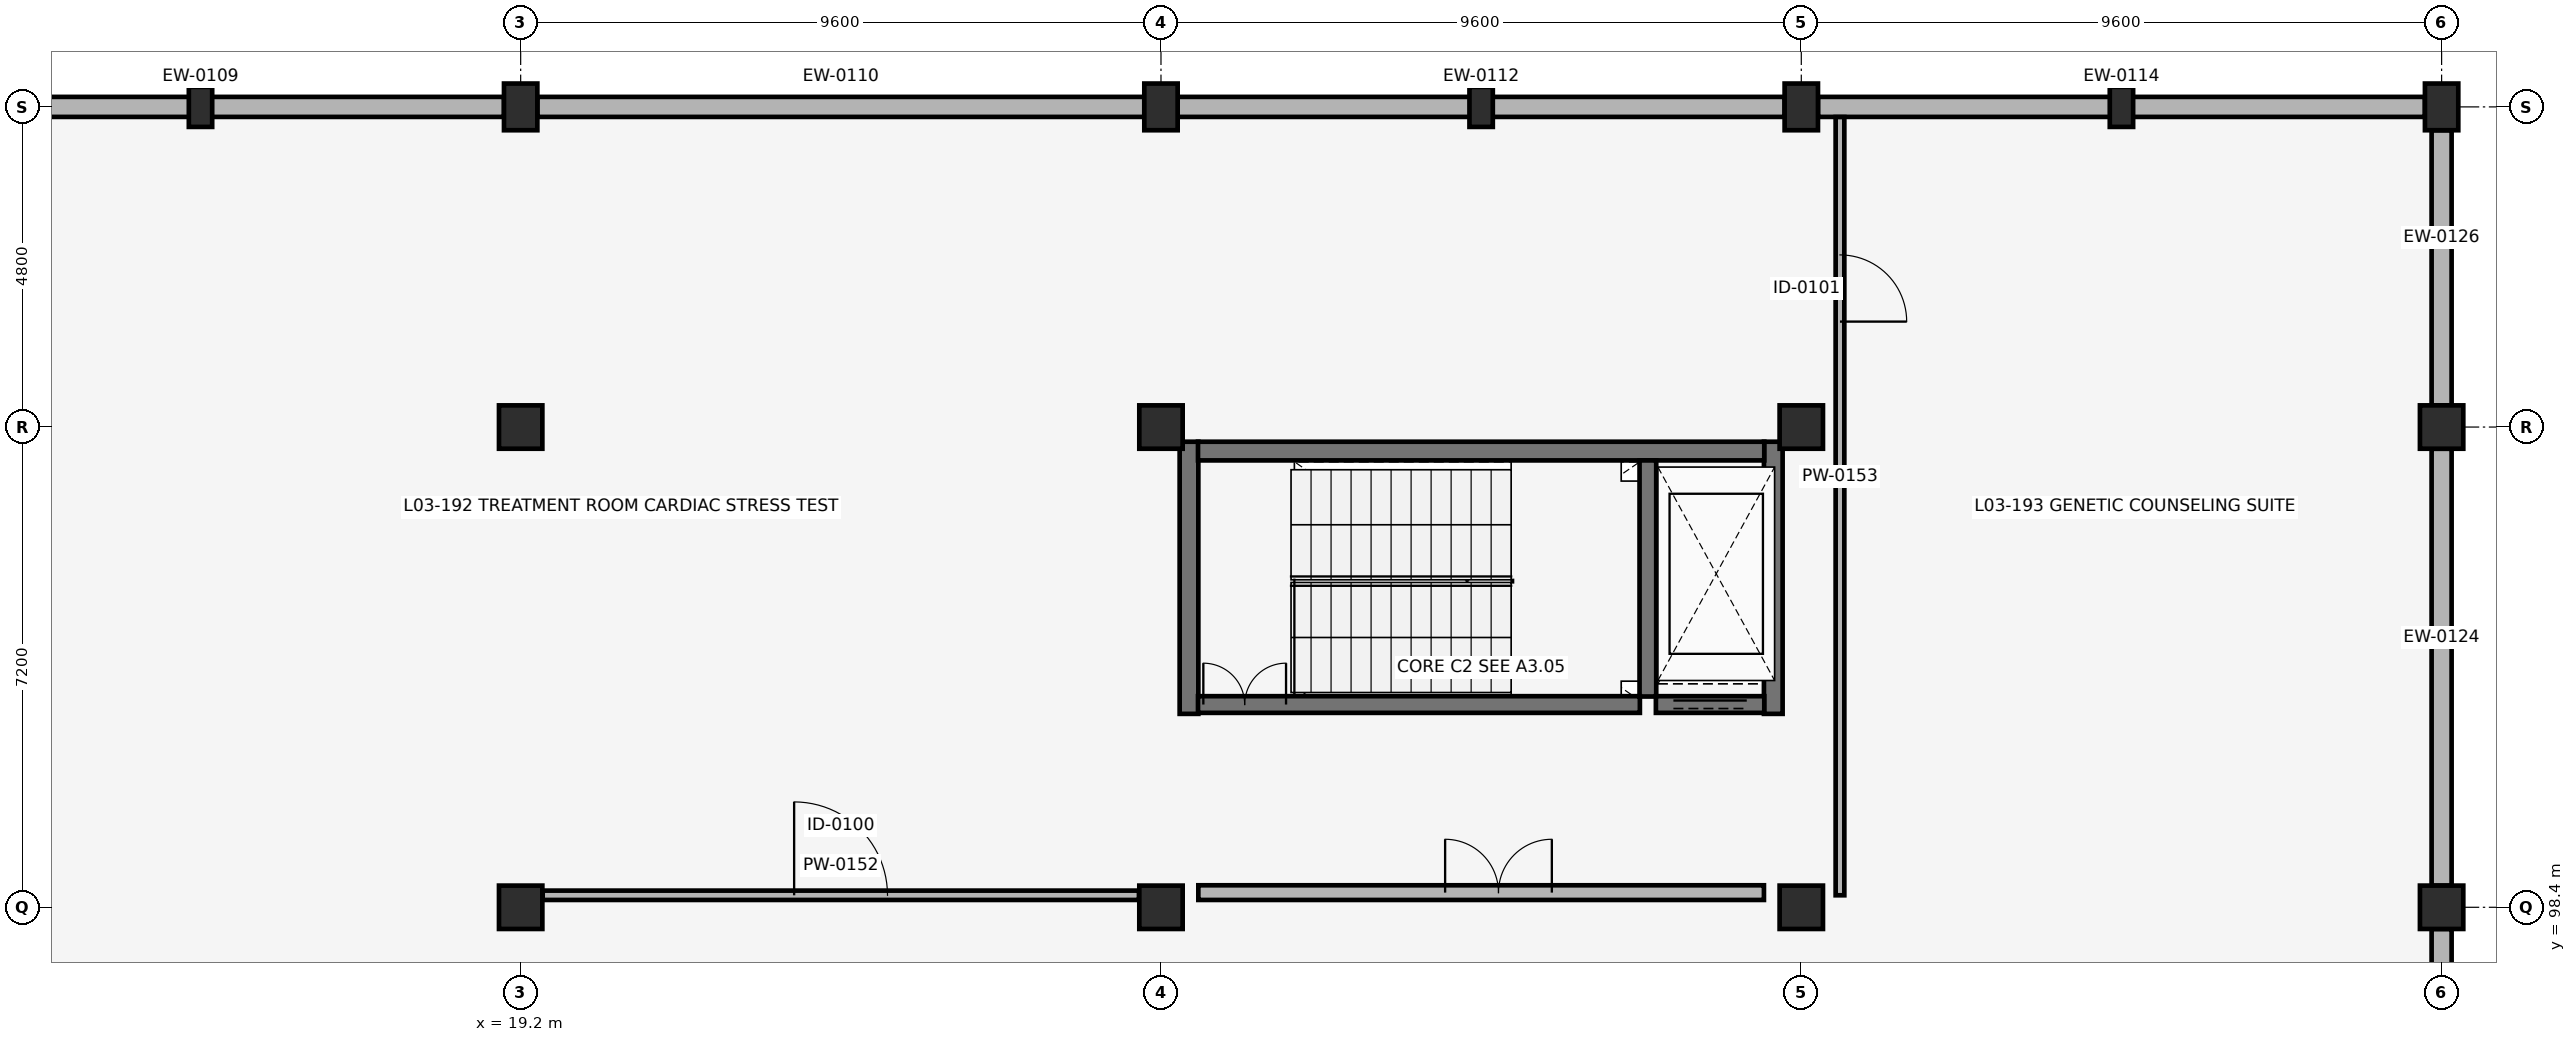
"""IFC4 building model, lengths in metres.
Left out: names, types, materials, properties, quantities, classifications, styles, units other than length and angle.
Written with IfcOpenShell. Run it as: python <this file> out.ifc"""

import sys

from ifc_helpers import new_model, si_unit, direction, frame, frame_2d, origin, origin_2d, place, context, subcontext, project, spatial, rectangle, extrude, element, fill, save


model = new_model("IFC4")
c1 = context("Model", 3, precision=1e-05, world=origin(), true_north=direction((0.0, 1.0)))
c2 = subcontext(c1, "Body", "Model", "MODEL_VIEW")
j1 = project(units=[si_unit("LENGTHUNIT", "METRE"), si_unit("PLANEANGLEUNIT", "RADIAN")], contexts=[c1])
p1 = place(None, origin())
s1 = spatial("IfcSite", under=j1, at=p1, CompositionType="ELEMENT")
p2 = place(p1, origin())
s2 = spatial("IfcBuilding", under=s1, at=p2, CompositionType="ELEMENT")
p3 = place(p2, frame((0.0, 0.0, 12.58)))
s3 = spatial("IfcBuildingStorey", under=s2, at=p3, CompositionType="ELEMENT", Elevation=12.58)
for number, where, z_axis, x_axis in (
    (1, (19.2, 98.4, 0.0), (0.0, 0.0, 1.0), (1.0, 0.0, 0.0)),
    (2, (19.2, 105.6, 0.0), (0.0, 0.0, 1.0), (1.0, 0.0, 0.0)),
):
    element("IfcColumn", number, at=place(p3, frame(where, z_axis=z_axis, x_axis=x_axis)), inside=s3, PredefinedType="COLUMN", context=c2, shape_type="SweptSolid", body=[
        extrude(rectangle(XDim=0.65, YDim=0.65, at=origin_2d()), origin(), (0.0, 0.0, 1.0), 4.08),
    ])
p4 = place(p3, frame((19.2, 110.4, 0.0), z_axis=(0.0, 0.0, 1.0), x_axis=(1.0, 0.0, 0.0)))
e3 = element("IfcColumn", 3, at=p4, inside=s3, PredefinedType="COLUMN", context=c2, shape_type="SweptSolid", body=[
    extrude(rectangle(XDim=0.5, YDim=0.7, at=origin_2d()), origin(), (0.0, 0.0, 1.0), 4.08),
])
for number, where, z_axis, x_axis in (
    (4, (28.8, 98.4, 0.0), (0.0, 0.0, 1.0), (1.0, 0.0, 0.0)),
    (5, (28.8, 105.6, 0.0), (0.0, 0.0, 1.0), (1.0, 0.0, 0.0)),
):
    element("IfcColumn", number, at=place(p3, frame(where, z_axis=z_axis, x_axis=x_axis)), inside=s3, PredefinedType="COLUMN", context=c2, shape_type="SweptSolid", body=[
        extrude(rectangle(XDim=0.65, YDim=0.65, at=origin_2d()), origin(), (0.0, 0.0, 1.0), 4.08),
    ])
p5 = place(p3, frame((28.8, 110.4, 0.0), z_axis=(0.0, 0.0, 1.0), x_axis=(1.0, 0.0, 0.0)))
e6 = element("IfcColumn", 6, at=p5, inside=s3, PredefinedType="COLUMN", context=c2, shape_type="SweptSolid", body=[
    extrude(rectangle(XDim=0.5, YDim=0.7, at=origin_2d()), origin(), (0.0, 0.0, 1.0), 4.08),
])
for number, where, z_axis, x_axis in (
    (7, (38.4, 98.4, 0.0), (0.0, 0.0, 1.0), (1.0, 0.0, 0.0)),
    (8, (38.4, 105.6, 0.0), (0.0, 0.0, 1.0), (1.0, 0.0, 0.0)),
):
    element("IfcColumn", number, at=place(p3, frame(where, z_axis=z_axis, x_axis=x_axis)), inside=s3, PredefinedType="COLUMN", context=c2, shape_type="SweptSolid", body=[
        extrude(rectangle(XDim=0.65, YDim=0.65, at=origin_2d()), origin(), (0.0, 0.0, 1.0), 4.08),
    ])
p6 = place(p3, frame((38.4, 110.4, 0.0), z_axis=(0.0, 0.0, 1.0), x_axis=(1.0, 0.0, 0.0)))
e9 = element("IfcColumn", 9, at=p6, inside=s3, PredefinedType="COLUMN", context=c2, shape_type="SweptSolid", body=[
    extrude(rectangle(XDim=0.5, YDim=0.7, at=origin_2d()), origin(), (0.0, 0.0, 1.0), 4.08),
])
for number, where, z_axis, x_axis in (
    (10, (48.0, 98.4, 0.0), (0.0, 0.0, 1.0), (1.0, 0.0, 0.0)),
    (11, (48.0, 105.6, 0.0), (0.0, 0.0, 1.0), (1.0, 0.0, 0.0)),
):
    element("IfcColumn", number, at=place(p3, frame(where, z_axis=z_axis, x_axis=x_axis)), inside=s3, PredefinedType="COLUMN", context=c2, shape_type="SweptSolid", body=[
        extrude(rectangle(XDim=0.65, YDim=0.65, at=origin_2d()), origin(), (0.0, 0.0, 1.0), 4.08),
    ])
p7 = place(p3, frame((48.0, 110.4, 0.0), z_axis=(0.0, 0.0, 1.0), x_axis=(1.0, 0.0, 0.0)))
e12 = element("IfcColumn", 12, at=p7, inside=s3, PredefinedType="COLUMN", context=c2, shape_type="SweptSolid", body=[
    extrude(rectangle(XDim=0.5, YDim=0.7, at=origin_2d()), origin(), (0.0, 0.0, 1.0), 4.08),
])
for number, where, z_axis, x_axis in (
    (13, (14.4, 110.4, 0.0), (0.0, 0.0, 1.0), (1.0, 0.0, 0.0)),
    (14, (33.6, 110.4, 0.0), (0.0, 0.0, 1.0), (1.0, 0.0, 0.0)),
    (15, (43.2, 110.4, 0.0), (0.0, 0.0, 1.0), (1.0, 0.0, 0.0)),
):
    element("IfcColumn", number, at=place(p3, frame(where, z_axis=z_axis, x_axis=x_axis)), inside=s3, PredefinedType="PILASTER", context=c2, shape_type="SweptSolid", body=[
        extrude(rectangle(XDim=0.35, YDim=0.6, at=origin_2d()), origin(), (0.0, 0.0, 1.0), 4.08),
    ])
p8 = place(p3, frame((18.95, 110.4, 0.0), z_axis=(0.0, 0.0, 1.0), x_axis=(-1.0, 0.0, 0.0)))
e16 = element("IfcWall", 16, at=p8, inside=s3, PredefinedType="SOLIDWALL", context=c2, shape_type="SweptSolid", body=[
    extrude(rectangle(XDim=9.1, YDim=0.3, at=frame_2d((4.55, 0.0))), origin(), (0.0, 0.0, 1.0), 3.08),
])
p9 = place(p3, frame((28.55, 110.4, 0.0), z_axis=(0.0, 0.0, 1.0), x_axis=(-1.0, 0.0, 0.0)))
e17 = element("IfcWall", 17, at=p9, inside=s3, PredefinedType="SOLIDWALL", context=c2, shape_type="SweptSolid", body=[
    extrude(rectangle(XDim=9.1, YDim=0.3, at=frame_2d((4.55, 0.0))), origin(), (0.0, 0.0, 1.0), 3.08),
])
p10 = place(p3, frame((38.15, 110.4, 0.0), z_axis=(0.0, 0.0, 1.0), x_axis=(-1.0, 0.0, 0.0)))
e18 = element("IfcWall", 18, at=p10, inside=s3, PredefinedType="SOLIDWALL", context=c2, shape_type="SweptSolid", body=[
    extrude(rectangle(XDim=9.1, YDim=0.3, at=frame_2d((4.55, 0.0))), origin(), (0.0, 0.0, 1.0), 3.08),
])
p11 = place(p3, frame((47.75, 110.4, 0.0), z_axis=(0.0, 0.0, 1.0), x_axis=(-1.0, 0.0, 0.0)))
e19 = element("IfcWall", 19, at=p11, inside=s3, PredefinedType="SOLIDWALL", context=c2, shape_type="SweptSolid", body=[
    extrude(rectangle(XDim=9.1, YDim=0.3, at=frame_2d((4.55, 0.0))), origin(), (0.0, 0.0, 1.0), 3.08),
])
p12 = place(p3, frame((48.0, 91.525, 0.0), z_axis=(0.0, 0.0, 1.0), x_axis=(0.0, 1.0, 0.0)))
e20 = element("IfcWall", 20, at=p12, inside=s3, PredefinedType="SOLIDWALL", context=c2, shape_type="SweptSolid", body=[
    extrude(rectangle(XDim=6.55, YDim=0.3, at=frame_2d((3.275, 0.0))), origin(), (0.0, 0.0, 1.0), 3.08),
])
p13 = place(p3, frame((48.0, 98.725, 0.0), z_axis=(0.0, 0.0, 1.0), x_axis=(0.0, 1.0, 0.0)))
e21 = element("IfcWall", 21, at=p13, inside=s3, PredefinedType="SOLIDWALL", context=c2, shape_type="SweptSolid", body=[
    extrude(rectangle(XDim=6.55, YDim=0.3, at=frame_2d((3.275, 0.0))), origin(), (0.0, 0.0, 1.0), 3.08),
])
p14 = place(p3, frame((48.0, 105.925, 0.0), z_axis=(0.0, 0.0, 1.0), x_axis=(0.0, 1.0, 0.0)))
e22 = element("IfcWall", 22, at=p14, inside=s3, PredefinedType="SOLIDWALL", context=c2, shape_type="SweptSolid", body=[
    extrude(rectangle(XDim=4.125, YDim=0.3, at=frame_2d((2.062, 0.0))), origin(), (0.0, 0.0, 1.0), 3.08),
])
for number, where, z_axis, x_axis in (
    (23, (29.22, 101.3, 0.0), (0.0, 0.0, 1.0), (0.0, 1.0, 0.0)),
    (24, (37.98, 101.3, 0.0), (0.0, 0.0, 1.0), (0.0, 1.0, 0.0)),
):
    element("IfcWall", number, at=place(p3, frame(where, z_axis=z_axis, x_axis=x_axis)), inside=s3, PredefinedType="SHEAR", context=c2, shape_type="SweptSolid", body=[
        extrude(rectangle(XDim=4.08, YDim=0.28, at=frame_2d((2.04, 0.0))), origin(), (0.0, 0.0, 1.0), 3.8),
    ])
p15 = place(p3, frame((29.355, 105.24, 0.0), z_axis=(0.0, 0.0, 1.0), x_axis=(1.0, 0.0, 0.0)))
e25 = element("IfcWall", 25, at=p15, inside=s3, PredefinedType="SHEAR", context=c2, shape_type="SweptSolid", body=[
    extrude(rectangle(XDim=8.49, YDim=0.28, at=frame_2d((4.245, 0.0))), origin(), (0.0, 0.0, 1.0), 3.8),
])
p16 = place(p3, frame((36.1, 101.56, 0.0), z_axis=(0.0, 0.0, 1.0), x_axis=(0.0, 1.0, 0.0)))
e26 = element("IfcWall", 26, at=p16, inside=s3, PredefinedType="SHEAR", context=c2, shape_type="SweptSolid", body=[
    extrude(rectangle(XDim=3.54, YDim=0.25, at=frame_2d((1.77, 0.0))), origin(), (0.0, 0.0, 1.0), 3.8),
])
p17 = place(p3, frame((29.355, 101.44, 0.0), z_axis=(0.0, 0.0, 1.0), x_axis=(1.0, 0.0, 0.0)))
e27 = element("IfcWall", 27, at=p17, inside=s3, PredefinedType="SHEAR", context=c2, shape_type="SweptSolid", body=[
    extrude(rectangle(XDim=6.625, YDim=0.25, at=frame_2d((3.312, 0.0))), origin(), (0.0, 0.0, 1.0), 3.8),
])
p18 = place(p17, frame((0.08, 0.0, 0.0)))
e28 = element("IfcOpeningElement", 28, at=p18, cuts=e27, PredefinedType="OPENING", context=c2, shape_type="SweptSolid", body=[
    extrude(rectangle(XDim=1.24, YDim=2.15, at=frame_2d((0.62, 1.075))), frame((0.0, 0.135, 0.0), z_axis=(0.0, -1.0, 0.0), x_axis=(1.0, 0.0, 0.0)), (0.0, 0.0, 1.0), 0.27),
])
p19 = place(p3, frame((29.36, 98.62, 0.0), z_axis=(0.0, 0.0, 1.0), x_axis=(1.0, 0.0, 0.0)))
e29 = element("IfcWall", 29, at=p19, inside=s3, PredefinedType="PARTITIONING", context=c2, shape_type="SweptSolid", body=[
    extrude(rectangle(XDim=8.48, YDim=0.22, at=frame_2d((4.24, 0.0))), origin(), (0.0, 0.0, 1.0), 3.13),
])
p20 = place(p19, frame((3.7, 0.0, 0.0)))
e30 = element("IfcOpeningElement", 30, at=p20, cuts=e29, PredefinedType="OPENING", context=c2, shape_type="SweptSolid", body=[
    extrude(rectangle(XDim=1.6, YDim=2.2, at=frame_2d((0.8, 1.1))), frame((0.0, 0.12, 0.0), z_axis=(0.0, -1.0, 0.0), x_axis=(1.0, 0.0, 0.0)), (0.0, 0.0, 1.0), 0.24),
])
p21 = place(p3, frame((36.22, 101.44, 0.0), z_axis=(0.0, 0.0, 1.0), x_axis=(1.0, 0.0, 0.0)))
e31 = element("IfcWall", 31, at=p21, inside=s3, PredefinedType="SHEAR", context=c2, shape_type="SweptSolid", body=[
    extrude(rectangle(XDim=1.625, YDim=0.25, at=frame_2d((0.812, 0.0))), origin(), (0.0, 0.0, 1.0), 3.8),
])
p22 = place(p21, frame((0.262, 0.0, 0.0)))
e32 = element("IfcOpeningElement", 32, at=p22, cuts=e31, PredefinedType="OPENING", context=c2, shape_type="SweptSolid", body=[
    extrude(rectangle(XDim=1.1, YDim=2.15, at=frame_2d((0.55, 1.075))), frame((0.0, 0.135, 0.0), z_axis=(0.0, -1.0, 0.0), x_axis=(1.0, 0.0, 0.0)), (0.0, 0.0, 1.0), 0.27),
])
p23 = place(p3, frame((19.53, 98.58, 0.0), z_axis=(0.0, 0.0, 1.0), x_axis=(1.0, 0.0, 0.0)))
e33 = element("IfcWall", 33, at=p23, inside=s3, PredefinedType="PARTITIONING", context=c2, shape_type="SweptSolid", body=[
    extrude(rectangle(XDim=8.94, YDim=0.14, at=frame_2d((4.47, 0.0))), origin(), (0.0, 0.0, 1.0), 3.12),
])
p24 = place(p23, frame((3.77, 0.0, 0.0)))
e34 = element("IfcOpeningElement", 34, at=p24, cuts=e33, PredefinedType="OPENING", context=c2, shape_type="SweptSolid", body=[
    extrude(rectangle(XDim=1.4, YDim=2.12, at=frame_2d((0.7, 1.06))), frame((0.0, 0.08, 0.0), z_axis=(0.0, -1.0, 0.0), x_axis=(1.0, 0.0, 0.0)), (0.0, 0.0, 1.0), 0.16),
])
p25 = place(p3, frame((38.98, 98.58, 0.0), z_axis=(0.0, 0.0, 1.0), x_axis=(0.0, 1.0, 0.0)))
e35 = element("IfcWall", 35, at=p25, inside=s3, PredefinedType="PARTITIONING", context=c2, shape_type="SweptSolid", body=[
    extrude(rectangle(XDim=11.668, YDim=0.13, at=frame_2d((5.834, 0.0))), origin(), (0.0, 0.0, 1.0), 3.09),
])
p26 = place(p25, frame((8.601, 0.0, 0.0)))
e36 = element("IfcOpeningElement", 36, at=p26, cuts=e35, PredefinedType="OPENING", context=c2, shape_type="SweptSolid", body=[
    extrude(rectangle(XDim=1.0, YDim=2.1, at=frame_2d((0.5, 1.05))), frame((0.0, 0.075, 0.0), z_axis=(0.0, -1.0, 0.0), x_axis=(1.0, 0.0, 0.0)), (0.0, 0.0, 1.0), 0.15),
])
p27 = place(p18, origin())
e37 = element("IfcDoor", 37, at=p27, inside=s3, OperationType="DOUBLE_DOOR_SINGLE_SWING", PredefinedType="DOOR", context=c2, shape_type="SweptSolid", body=[
    extrude(rectangle(XDim=1.24, YDim=2.15, at=frame_2d((0.62, 1.075))), frame((0.0, 0.025, 0.0), z_axis=(0.0, -1.0, 0.0), x_axis=(1.0, 0.0, 0.0)), (0.0, 0.0, 1.0), 0.05),
])
fill(e28, e37)
p28 = place(p20, origin())
e38 = element("IfcDoor", 38, at=p28, inside=s3, OperationType="DOUBLE_DOOR_SINGLE_SWING", PredefinedType="DOOR", context=c2, shape_type="SweptSolid", body=[
    extrude(rectangle(XDim=1.6, YDim=2.2, at=frame_2d((0.8, 1.1))), frame((0.0, 0.025, 0.0), z_axis=(0.0, -1.0, 0.0), x_axis=(1.0, 0.0, 0.0)), (0.0, 0.0, 1.0), 0.05),
])
fill(e30, e38)
p29 = place(p22, origin())
e39 = element("IfcDoor", 39, at=p29, inside=s3, OperationType="DOUBLE_DOOR_SLIDING", PredefinedType="DOOR", context=c2, shape_type="SweptSolid", body=[
    extrude(rectangle(XDim=1.1, YDim=2.15, at=frame_2d((0.55, 1.075))), frame((0.0, 0.025, 0.0), z_axis=(0.0, -1.0, 0.0), x_axis=(1.0, 0.0, 0.0)), (0.0, 0.0, 1.0), 0.05),
])
fill(e32, e39)
p30 = place(p24, origin())
e40 = element("IfcDoor", 40, at=p30, inside=s3, OperationType="SINGLE_SWING_LEFT", PredefinedType="DOOR", context=c2, shape_type="SweptSolid", body=[
    extrude(rectangle(XDim=1.4, YDim=2.12, at=frame_2d((0.7, 1.06))), frame((0.0, 0.025, 0.0), z_axis=(0.0, -1.0, 0.0), x_axis=(1.0, 0.0, 0.0)), (0.0, 0.0, 1.0), 0.05),
])
fill(e34, e40)
p31 = place(p26, origin())
e41 = element("IfcDoor", 41, at=p31, inside=s3, OperationType="SINGLE_SWING_RIGHT", PredefinedType="DOOR", context=c2, shape_type="SweptSolid", body=[
    extrude(rectangle(XDim=1.0, YDim=2.1, at=frame_2d((0.5, 1.05))), frame((0.0, 0.025, 0.0), z_axis=(0.0, -1.0, 0.0), x_axis=(1.0, 0.0, 0.0)), (0.0, 0.0, 1.0), 0.05),
])
fill(e36, e41)
save(model, sys.argv[1])
